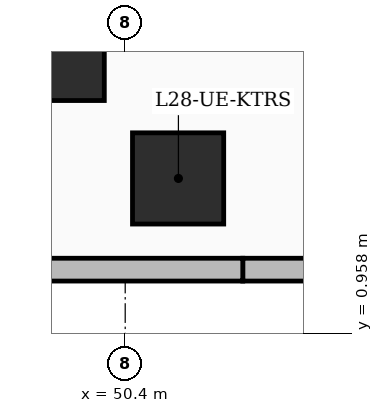
"""IFC4 building model, lengths in metres.
Left out: names, types, materials, properties, quantities, classifications, styles, units other than length and angle.
Written with IfcOpenShell. Run it as: python <this file> out.ifc"""

import sys

from ifc_helpers import new_model, si_unit, direction, frame, frame_2d, origin, origin_2d, place, context, subcontext, project, spatial, rectangle, extrude, element, save


model = new_model("IFC4")
c1 = context("Model", 3, precision=1e-05, world=origin(), true_north=direction((0.0, 1.0)))
c2 = subcontext(c1, "Body", "Model", "MODEL_VIEW")
j1 = project(units=[si_unit("LENGTHUNIT", "METRE"), si_unit("PLANEANGLEUNIT", "RADIAN")], contexts=[c1])
p1 = place(None, origin())
s1 = spatial("IfcSite", under=j1, at=p1, CompositionType="ELEMENT")
p2 = place(p1, origin())
s2 = spatial("IfcBuilding", under=s1, at=p2, CompositionType="ELEMENT")
p3 = place(p2, frame((0.0, 0.0, 114.0)))
s3 = spatial("IfcBuildingStorey", under=s2, at=p3, CompositionType="ELEMENT", Elevation=114.0)
p4 = place(p3, frame((49.6, 4.55, 0.0), z_axis=(0.0, 0.0, 1.0), x_axis=(1.0, 0.0, 0.0)))
e1 = element("IfcColumn", 1, at=p4, inside=s3, PredefinedType="COLUMN", context=c2, shape_type="SweptSolid", body=[
    extrude(rectangle(XDim=1.05, YDim=1.05, at=origin_2d()), origin(), (0.0, 0.0, 1.0), 3.6),
])
p5 = place(p3, frame((51.096, 3.0, 0.0), z_axis=(0.0, 0.0, 1.0), x_axis=(1.0, 0.0, 0.0)))
e2 = element("IfcColumn", 2, at=p5, inside=s3, PredefinedType="COLUMN", context=c2, shape_type="SweptSolid", body=[
    extrude(rectangle(XDim=1.2, YDim=1.2, at=origin_2d()), origin(), (0.0, 0.0, 1.0), 3.6),
])
p6 = place(p3, frame((58.35, 1.8, 0.0), z_axis=(0.0, 0.0, 1.0), x_axis=(-1.0, 0.0, 0.0)))
e3 = element("IfcWall", 3, at=p6, inside=s3, PredefinedType="SOLIDWALL", context=c2, shape_type="SweptSolid", body=[
    extrude(rectangle(XDim=6.403, YDim=0.3, at=frame_2d((3.202, 0.0))), origin(), (0.0, 0.0, 1.0), 3.35),
])
p7 = place(p6, frame((2.885, 0.0, 0.55)))
e4 = element("IfcOpeningElement", 4, at=p7, cuts=e3, PredefinedType="OPENING", context=c2, shape_type="SweptSolid", body=[
    extrude(rectangle(XDim=2.1, YDim=2.4, at=frame_2d((1.05, 1.2))), frame((0.0, 0.16, 0.0), z_axis=(0.0, -1.0, 0.0), x_axis=(1.0, 0.0, 0.0)), (0.0, 0.0, 1.0), 0.32),
])
p8 = place(p3, frame((51.947, 1.8, 0.0), z_axis=(0.0, 0.0, 1.0), x_axis=(-1.0, 0.0, 0.0)))
e5 = element("IfcWall", 5, at=p8, inside=s3, PredefinedType="SOLIDWALL", context=c2, shape_type="SweptSolid", body=[
    extrude(rectangle(XDim=6.993, YDim=0.3, at=frame_2d((3.497, 0.0))), origin(), (0.0, 0.0, 1.0), 3.35),
])
p9 = place(p8, frame((3.375, 0.0, 0.6)))
e6 = element("IfcOpeningElement", 6, at=p9, cuts=e5, PredefinedType="OPENING", context=c2, shape_type="SweptSolid", body=[
    extrude(rectangle(XDim=1.8, YDim=2.1, at=frame_2d((0.9, 1.05))), frame((0.0, 0.16, 0.0), z_axis=(0.0, -1.0, 0.0), x_axis=(1.0, 0.0, 0.0)), (0.0, 0.0, 1.0), 0.32),
])
save(model, sys.argv[1])
